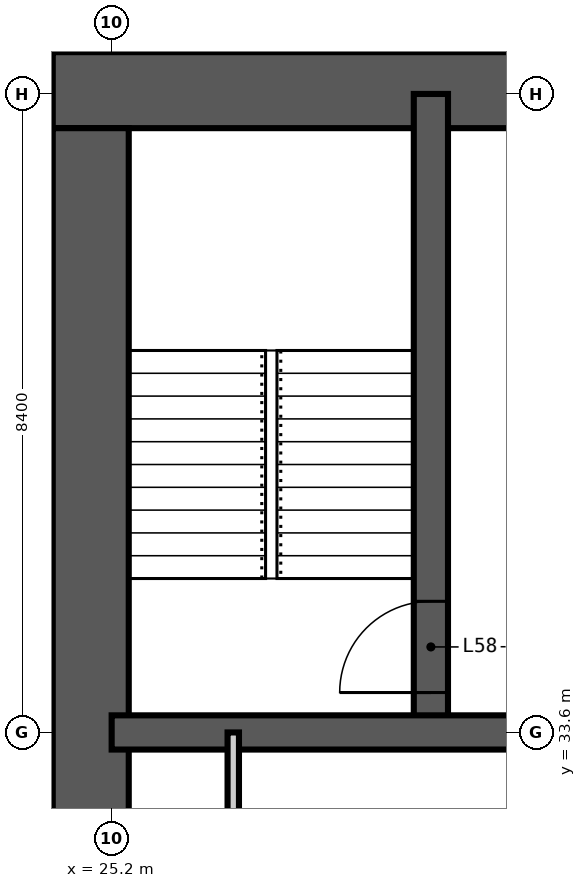
"""IFC4 building model, lengths in metres.
Left out: names, types, materials, properties, quantities, classifications, styles, units other than length and angle.
Written with IfcOpenShell. Run it as: python <this file> out.ifc"""

import sys

from ifc_helpers import new_model, si_unit, direction, frame, frame_2d, origin, place, context, subcontext, project, spatial, rectangle, extrude, element, fill, save


model = new_model("IFC4")
c1 = context("Model", 3, precision=1e-05, world=origin(), true_north=direction((0.0, 1.0)))
c2 = subcontext(c1, "Body", "Model", "MODEL_VIEW")
j1 = project(units=[si_unit("LENGTHUNIT", "METRE"), si_unit("PLANEANGLEUNIT", "RADIAN")], contexts=[c1])
p1 = place(None, origin())
s1 = spatial("IfcSite", under=j1, at=p1, CompositionType="ELEMENT")
p2 = place(p1, origin())
s2 = spatial("IfcBuilding", under=s1, at=p2, CompositionType="ELEMENT")
p3 = place(p2, frame((0.0, 0.0, 225.6)))
s3 = spatial("IfcBuildingStorey", under=s2, at=p3, CompositionType="ELEMENT", Elevation=225.6)
p4 = place(p3, frame((42.55, 42.05, -0.35), z_axis=(0.0, 0.0, 1.0), x_axis=(-1.0, 0.0, 0.0)))
e1 = element("IfcWall", 1, at=p4, inside=s3, PredefinedType="SHEAR", context=c2, shape_type="SweptSolid", body=[
    extrude(rectangle(XDim=18.125, YDim=1.0, at=frame_2d((9.062, 0.0))), origin(), (0.0, 0.0, 1.0), 3.9),
])
p5 = place(p4, frame((10.45, 0.0, 0.35)))
e2 = element("IfcOpeningElement", 2, at=p5, cuts=e1, PredefinedType="OPENING", context=c2, shape_type="SweptSolid", body=[
    extrude(rectangle(XDim=1.2, YDim=2.2, at=frame_2d((0.6, 1.1))), frame((0.0, 0.51, 0.0), z_axis=(0.0, -1.0, 0.0), x_axis=(1.0, 0.0, 0.0)), (0.0, 0.0, 1.0), 1.02),
])
p6 = place(p3, frame((24.925, 41.55, -0.35), z_axis=(0.0, 0.0, 1.0), x_axis=(0.0, -1.0, 0.0)))
e3 = element("IfcWall", 3, at=p6, inside=s3, PredefinedType="SHEAR", context=c2, shape_type="SweptSolid", body=[
    extrude(rectangle(XDim=24.3, YDim=1.0, at=frame_2d((12.15, 0.0))), origin(), (0.0, 0.0, 1.0), 3.9),
])
p7 = place(p6, frame((11.65, 0.0, 0.35)))
e4 = element("IfcOpeningElement", 4, at=p7, cuts=e3, PredefinedType="OPENING", context=c2, shape_type="SweptSolid", body=[
    extrude(rectangle(XDim=1.0, YDim=2.1, at=frame_2d((0.5, 1.05))), frame((0.0, 0.51, 0.0), z_axis=(0.0, -1.0, 0.0), x_axis=(1.0, 0.0, 0.0)), (0.0, 0.0, 1.0), 1.02),
])
p8 = place(p3, frame((29.4, 33.6, -0.35), z_axis=(0.0, 0.0, 1.0), x_axis=(0.0, 1.0, 0.0)))
e5 = element("IfcWall", 5, at=p8, inside=s3, PredefinedType="SHEAR", context=c2, shape_type="SweptSolid", body=[
    extrude(rectangle(XDim=8.4, YDim=0.45, at=frame_2d((4.2, 0.0))), origin(), (0.0, 0.0, 1.0), 3.9),
])
p9 = place(p8, frame((0.525, 0.0, 0.35)))
e6 = element("IfcOpeningElement", 6, at=p9, cuts=e5, PredefinedType="OPENING", context=c2, shape_type="SweptSolid", body=[
    extrude(rectangle(XDim=1.2, YDim=2.2, at=frame_2d((0.6, 1.1))), frame((0.0, 0.235, 0.0), z_axis=(0.0, -1.0, 0.0), x_axis=(1.0, 0.0, 0.0)), (0.0, 0.0, 1.0), 0.47),
])
p10 = place(p3, frame((25.2, 33.6, -0.35), z_axis=(0.0, 0.0, 1.0), x_axis=(1.0, 0.0, 0.0)))
e7 = element("IfcWall", 7, at=p10, inside=s3, PredefinedType="SHEAR", context=c2, shape_type="SweptSolid", body=[
    extrude(rectangle(XDim=16.8, YDim=0.45, at=frame_2d((8.4, 0.0))), origin(), (0.0, 0.0, 1.0), 3.9),
])
p11 = place(p3, frame((26.8, 25.2, 0.0), z_axis=(0.0, 0.0, 1.0), x_axis=(0.0, 1.0, 0.0)))
e8 = element("IfcWall", 8, at=p11, inside=s3, PredefinedType="PARTITIONING", context=c2, shape_type="SweptSolid", body=[
    extrude(rectangle(XDim=8.4, YDim=0.15, at=frame_2d((4.2, 0.0))), origin(), (0.0, 0.0, 1.0), 3.55),
])
p12 = place(p11, frame((0.9, 0.0, 0.0)))
e9 = element("IfcOpeningElement", 9, at=p12, cuts=e8, PredefinedType="OPENING", context=c2, shape_type="SweptSolid", body=[
    extrude(rectangle(XDim=1.0, YDim=2.1, at=frame_2d((0.5, 1.05))), frame((0.0, 0.085, 0.0), z_axis=(0.0, -1.0, 0.0), x_axis=(1.0, 0.0, 0.0)), (0.0, 0.0, 1.0), 0.17),
])
p13 = place(p11, frame((5.1, 0.0, 0.0)))
e10 = element("IfcOpeningElement", 10, at=p13, cuts=e8, PredefinedType="OPENING", context=c2, shape_type="SweptSolid", body=[
    extrude(rectangle(XDim=1.0, YDim=2.1, at=frame_2d((0.5, 1.05))), frame((0.0, 0.085, 0.0), z_axis=(0.0, -1.0, 0.0), x_axis=(1.0, 0.0, 0.0)), (0.0, 0.0, 1.0), 0.17),
])
p14 = place(p9, origin())
e11 = element("IfcDoor", 11, at=p14, inside=s3, OperationType="SINGLE_SWING_LEFT", PredefinedType="DOOR", context=c2, shape_type="SweptSolid", body=[
    extrude(rectangle(XDim=1.2, YDim=2.2, at=frame_2d((0.6, 1.1))), frame((0.0, 0.025, 0.0), z_axis=(0.0, -1.0, 0.0), x_axis=(1.0, 0.0, 0.0)), (0.0, 0.0, 1.0), 0.05),
])
fill(e6, e11)
save(model, sys.argv[1])
